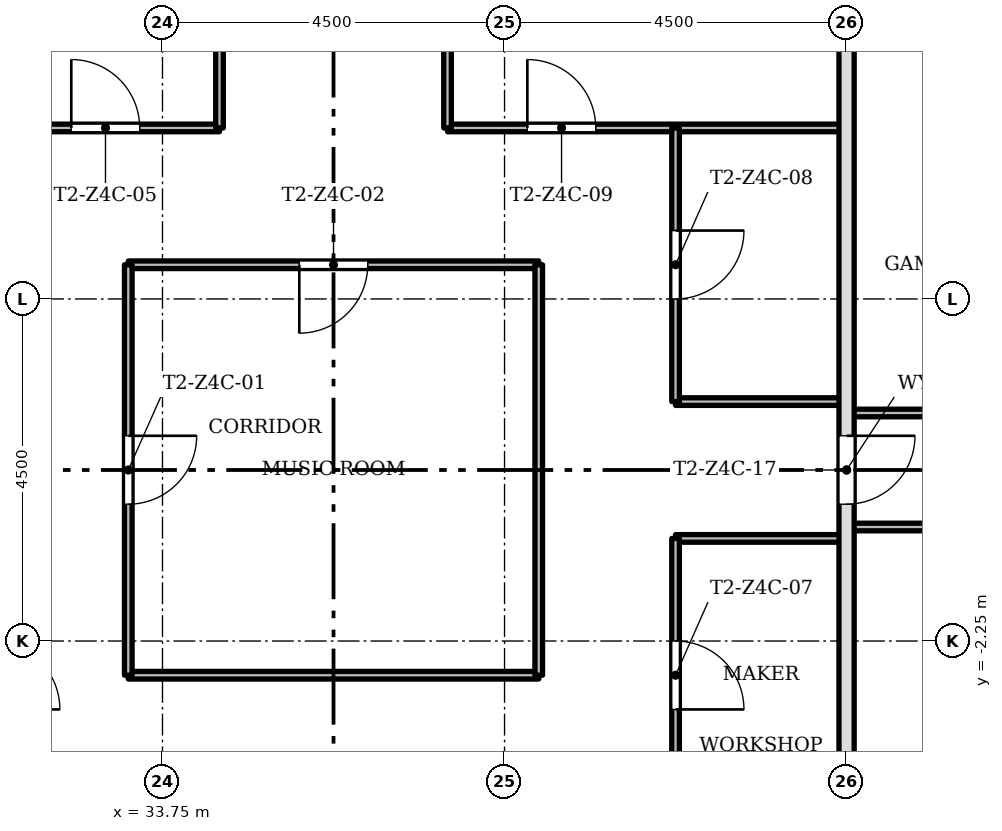
"""IFC4 building model, lengths in metres.
Left out: names, types, materials, properties, quantities, classifications, styles, units other than length and angle.
Written with IfcOpenShell. Run it as: python <this file> out.ifc"""

import sys

from ifc_helpers import new_model, si_unit, direction, frame, frame_2d, origin, place, context, subcontext, project, spatial, rectangle, extrude, element, fill, save


model = new_model("IFC4")
c1 = context("Model", 3, precision=1e-05, world=origin(), true_north=direction((0.0, 1.0)))
c2 = subcontext(c1, "Body", "Model", "MODEL_VIEW")
j1 = project(units=[si_unit("LENGTHUNIT", "METRE"), si_unit("PLANEANGLEUNIT", "RADIAN")], contexts=[c1])
p1 = place(None, origin())
s1 = spatial("IfcSite", under=j1, at=p1, CompositionType="ELEMENT")
p2 = place(p1, origin())
s2 = spatial("IfcBuilding", under=s1, at=p2, CompositionType="ELEMENT")
p3 = place(p2, frame((0.0, 0.0, 192.6)))
s3 = spatial("IfcBuildingStorey", under=s2, at=p3, CompositionType="ELEMENT", Elevation=192.6)
p4 = place(p3, frame((38.7, -2.7, 0.0), z_axis=(0.0, 0.0, 1.0), x_axis=(-1.0, 0.0, 0.0)))
e1 = element("IfcWall", 1, at=p4, inside=s3, PredefinedType="PARTITIONING", context=c2, shape_type="SweptSolid", body=[
    extrude(rectangle(XDim=5.4, YDim=0.1, at=frame_2d((2.7, 0.0))), origin(), (0.0, 0.0, 1.0), 3.0),
])
p5 = place(p3, frame((42.75, -0.9, 0.0), z_axis=(0.0, 0.0, 1.0), x_axis=(-1.0, 0.0, 0.0)))
e2 = element("IfcWall", 2, at=p5, inside=s3, PredefinedType="PARTITIONING", context=c2, shape_type="SweptSolid", body=[
    extrude(rectangle(XDim=2.25, YDim=0.1, at=frame_2d((1.125, 0.0))), origin(), (0.0, 0.0, 1.0), 3.0),
])
p6 = place(p3, frame((47.25, -0.75, 0.0), z_axis=(0.0, 0.0, 1.0), x_axis=(-1.0, 0.0, 0.0)))
e3 = element("IfcWall", 3, at=p6, inside=s3, PredefinedType="PARTITIONING", context=c2, shape_type="SweptSolid", body=[
    extrude(rectangle(XDim=4.5, YDim=0.1, at=frame_2d((2.25, 0.0))), origin(), (0.0, 0.0, 1.0), 3.0),
])
p7 = place(p6, frame((1.8, 0.0, 0.0)))
e4 = element("IfcOpeningElement", 4, at=p7, cuts=e3, PredefinedType="OPENING", context=c2, shape_type="SweptSolid", body=[
    extrude(rectangle(XDim=0.9, YDim=2.1, at=frame_2d((0.45, 1.05))), frame((0.0, 0.06, 0.0), z_axis=(0.0, -1.0, 0.0), x_axis=(1.0, 0.0, 0.0)), (0.0, 0.0, 1.0), 0.12),
])
p8 = place(p3, frame((47.25, 0.75, 0.0), z_axis=(0.0, 0.0, 1.0), x_axis=(-1.0, 0.0, 0.0)))
e5 = element("IfcWall", 5, at=p8, inside=s3, PredefinedType="PARTITIONING", context=c2, shape_type="SweptSolid", body=[
    extrude(rectangle(XDim=4.5, YDim=0.1, at=frame_2d((2.25, 0.0))), origin(), (0.0, 0.0, 1.0), 3.0),
])
p9 = place(p8, frame((1.8, 0.0, 0.0)))
e6 = element("IfcOpeningElement", 6, at=p9, cuts=e5, PredefinedType="OPENING", context=c2, shape_type="SweptSolid", body=[
    extrude(rectangle(XDim=0.9, YDim=2.1, at=frame_2d((0.45, 1.05))), frame((0.0, 0.06, 0.0), z_axis=(0.0, -1.0, 0.0), x_axis=(1.0, 0.0, 0.0)), (0.0, 0.0, 1.0), 0.12),
])
p10 = place(p3, frame((42.75, 0.9, 0.0), z_axis=(0.0, 0.0, 1.0), x_axis=(-1.0, 0.0, 0.0)))
e7 = element("IfcWall", 7, at=p10, inside=s3, PredefinedType="PARTITIONING", context=c2, shape_type="SweptSolid", body=[
    extrude(rectangle(XDim=2.25, YDim=0.1, at=frame_2d((1.125, 0.0))), origin(), (0.0, 0.0, 1.0), 3.0),
])
p11 = place(p3, frame((38.7, 2.7, 0.0), z_axis=(0.0, 0.0, 1.0), x_axis=(-1.0, 0.0, 0.0)))
e8 = element("IfcWall", 8, at=p11, inside=s3, PredefinedType="PARTITIONING", context=c2, shape_type="SweptSolid", body=[
    extrude(rectangle(XDim=5.4, YDim=0.1, at=frame_2d((2.7, 0.0))), origin(), (0.0, 0.0, 1.0), 3.0),
])
p12 = place(p11, frame((2.25, 0.0, 0.0)))
e9 = element("IfcOpeningElement", 9, at=p12, cuts=e8, PredefinedType="OPENING", context=c2, shape_type="SweptSolid", body=[
    extrude(rectangle(XDim=0.9, YDim=2.1, at=frame_2d((0.45, 1.05))), frame((0.0, 0.06, 0.0), z_axis=(0.0, -1.0, 0.0), x_axis=(1.0, 0.0, 0.0)), (0.0, 0.0, 1.0), 0.12),
])
p13 = place(p3, frame((42.75, 4.5, 0.0), z_axis=(0.0, 0.0, 1.0), x_axis=(-1.0, 0.0, 0.0)))
e10 = element("IfcWall", 10, at=p13, inside=s3, PredefinedType="PARTITIONING", context=c2, shape_type="SweptSolid", body=[
    extrude(rectangle(XDim=5.25, YDim=0.1, at=frame_2d((2.625, 0.0))), origin(), (0.0, 0.0, 1.0), 3.0),
])
p14 = place(p13, frame((3.3, 0.0, 0.0)))
e11 = element("IfcOpeningElement", 11, at=p14, cuts=e10, PredefinedType="OPENING", context=c2, shape_type="SweptSolid", body=[
    extrude(rectangle(XDim=0.9, YDim=2.1, at=frame_2d((0.45, 1.05))), frame((0.0, 0.06, 0.0), z_axis=(0.0, -1.0, 0.0), x_axis=(1.0, 0.0, 0.0)), (0.0, 0.0, 1.0), 0.12),
])
p15 = place(p3, frame((34.5, 4.5, 0.0), z_axis=(0.0, 0.0, 1.0), x_axis=(-1.0, 0.0, 0.0)))
e12 = element("IfcWall", 12, at=p15, inside=s3, PredefinedType="PARTITIONING", context=c2, shape_type="SweptSolid", body=[
    extrude(rectangle(XDim=3.0, YDim=0.1, at=frame_2d((1.5, 0.0))), origin(), (0.0, 0.0, 1.0), 3.0),
])
p16 = place(p15, frame((1.05, 0.0, 0.0)))
e13 = element("IfcOpeningElement", 13, at=p16, cuts=e12, PredefinedType="OPENING", context=c2, shape_type="SweptSolid", body=[
    extrude(rectangle(XDim=0.9, YDim=2.1, at=frame_2d((0.45, 1.05))), frame((0.0, 0.06, 0.0), z_axis=(0.0, -1.0, 0.0), x_axis=(1.0, 0.0, 0.0)), (0.0, 0.0, 1.0), 0.12),
])
p17 = place(p3, frame((42.75, -6.85, 0.0), z_axis=(0.0, 0.0, 1.0), x_axis=(0.0, 1.0, 0.0)))
e14 = element("IfcWall", 14, at=p17, inside=s3, PredefinedType="SOLIDWALL", context=c2, shape_type="SweptSolid", body=[
    extrude(rectangle(XDim=13.7, YDim=0.2, at=frame_2d((6.85, 0.0))), origin(), (0.0, 0.0, 1.0), 3.0),
])
p18 = place(p17, frame((6.4, 0.0, 0.0)))
e15 = element("IfcOpeningElement", 15, at=p18, cuts=e14, PredefinedType="OPENING", context=c2, shape_type="SweptSolid", body=[
    extrude(rectangle(XDim=0.9, YDim=2.1, at=frame_2d((0.45, 1.05))), frame((0.0, 0.11, 0.0), z_axis=(0.0, -1.0, 0.0), x_axis=(1.0, 0.0, 0.0)), (0.0, 0.0, 1.0), 0.22),
])
p19 = place(p3, frame((40.5, -4.5, 0.0), z_axis=(0.0, 0.0, 1.0), x_axis=(0.0, 1.0, 0.0)))
e16 = element("IfcWall", 16, at=p19, inside=s3, PredefinedType="PARTITIONING", context=c2, shape_type="SweptSolid", body=[
    extrude(rectangle(XDim=3.6, YDim=0.1, at=frame_2d((1.8, 0.0))), origin(), (0.0, 0.0, 1.0), 3.0),
])
p20 = place(p19, frame((1.35, 0.0, 0.0)))
e17 = element("IfcOpeningElement", 17, at=p20, cuts=e16, PredefinedType="OPENING", context=c2, shape_type="SweptSolid", body=[
    extrude(rectangle(XDim=0.9, YDim=2.1, at=frame_2d((0.45, 1.05))), frame((0.0, 0.06, 0.0), z_axis=(0.0, -1.0, 0.0), x_axis=(1.0, 0.0, 0.0)), (0.0, 0.0, 1.0), 0.12),
])
p21 = place(p3, frame((40.5, 0.9, 0.0), z_axis=(0.0, 0.0, 1.0), x_axis=(0.0, 1.0, 0.0)))
e18 = element("IfcWall", 18, at=p21, inside=s3, PredefinedType="PARTITIONING", context=c2, shape_type="SweptSolid", body=[
    extrude(rectangle(XDim=3.6, YDim=0.1, at=frame_2d((1.8, 0.0))), origin(), (0.0, 0.0, 1.0), 3.0),
])
p22 = place(p21, frame((1.35, 0.0, 0.0)))
e19 = element("IfcOpeningElement", 19, at=p22, cuts=e18, PredefinedType="OPENING", context=c2, shape_type="SweptSolid", body=[
    extrude(rectangle(XDim=0.9, YDim=2.1, at=frame_2d((0.45, 1.05))), frame((0.0, 0.06, 0.0), z_axis=(0.0, -1.0, 0.0), x_axis=(1.0, 0.0, 0.0)), (0.0, 0.0, 1.0), 0.12),
])
p23 = place(p3, frame((38.7, -2.7, 0.0), z_axis=(0.0, 0.0, 1.0), x_axis=(0.0, 1.0, 0.0)))
e20 = element("IfcWall", 20, at=p23, inside=s3, PredefinedType="PARTITIONING", context=c2, shape_type="SweptSolid", body=[
    extrude(rectangle(XDim=5.4, YDim=0.1, at=frame_2d((2.7, 0.0))), origin(), (0.0, 0.0, 1.0), 3.0),
])
for number, where, z_axis, x_axis in (
    (21, (37.5, 4.5, 0.0), (0.0, 0.0, 1.0), (0.0, 1.0, 0.0)),
    (22, (34.5, 4.5, 0.0), (0.0, 0.0, 1.0), (0.0, 1.0, 0.0)),
):
    element("IfcWall", number, at=place(p3, frame(where, z_axis=z_axis, x_axis=x_axis)), inside=s3, PredefinedType="PARTITIONING", context=c2, shape_type="SweptSolid", body=[
        extrude(rectangle(XDim=2.25, YDim=0.1, at=frame_2d((1.125, 0.0))), origin(), (0.0, 0.0, 1.0), 3.0),
    ])
p24 = place(p3, frame((33.3, -2.7, 0.0), z_axis=(0.0, 0.0, 1.0), x_axis=(0.0, 1.0, 0.0)))
e23 = element("IfcWall", 23, at=p24, inside=s3, PredefinedType="PARTITIONING", context=c2, shape_type="SweptSolid", body=[
    extrude(rectangle(XDim=5.4, YDim=0.1, at=frame_2d((2.7, 0.0))), origin(), (0.0, 0.0, 1.0), 3.0),
])
p25 = place(p24, frame((2.25, 0.0, 0.0)))
e24 = element("IfcOpeningElement", 24, at=p25, cuts=e23, PredefinedType="OPENING", context=c2, shape_type="SweptSolid", body=[
    extrude(rectangle(XDim=0.9, YDim=2.1, at=frame_2d((0.45, 1.05))), frame((0.0, 0.06, 0.0), z_axis=(0.0, -1.0, 0.0), x_axis=(1.0, 0.0, 0.0)), (0.0, 0.0, 1.0), 0.12),
])
p26 = place(p25, origin())
e25 = element("IfcDoor", 25, at=p26, inside=s3, OperationType="SINGLE_SWING_RIGHT", PredefinedType="DOOR", context=c2, shape_type="SweptSolid", body=[
    extrude(rectangle(XDim=0.9, YDim=2.1, at=frame_2d((0.45, 1.05))), frame((0.0, 0.025, 0.0), z_axis=(0.0, -1.0, 0.0), x_axis=(1.0, 0.0, 0.0)), (0.0, 0.0, 1.0), 0.05),
])
fill(e24, e25)
p27 = place(p12, origin())
e26 = element("IfcDoor", 26, at=p27, inside=s3, OperationType="SINGLE_SWING_LEFT", PredefinedType="DOOR", context=c2, shape_type="SweptSolid", body=[
    extrude(rectangle(XDim=0.9, YDim=2.1, at=frame_2d((0.45, 1.05))), frame((0.0, 0.025, 0.0), z_axis=(0.0, -1.0, 0.0), x_axis=(1.0, 0.0, 0.0)), (0.0, 0.0, 1.0), 0.05),
])
fill(e9, e26)
p28 = place(p16, origin())
e27 = element("IfcDoor", 27, at=p28, inside=s3, OperationType="SINGLE_SWING_RIGHT", PredefinedType="DOOR", context=c2, shape_type="SweptSolid", body=[
    extrude(rectangle(XDim=0.9, YDim=2.1, at=frame_2d((0.45, 1.05))), frame((0.0, 0.025, 0.0), z_axis=(0.0, -1.0, 0.0), x_axis=(1.0, 0.0, 0.0)), (0.0, 0.0, 1.0), 0.05),
])
fill(e13, e27)
p29 = place(p20, origin())
e28 = element("IfcDoor", 28, at=p29, inside=s3, OperationType="SINGLE_SWING_LEFT", PredefinedType="DOOR", context=c2, shape_type="SweptSolid", body=[
    extrude(rectangle(XDim=0.9, YDim=2.1, at=frame_2d((0.45, 1.05))), frame((0.0, 0.025, 0.0), z_axis=(0.0, -1.0, 0.0), x_axis=(1.0, 0.0, 0.0)), (0.0, 0.0, 1.0), 0.05),
])
fill(e17, e28)
p30 = place(p22, origin())
e29 = element("IfcDoor", 29, at=p30, inside=s3, OperationType="SINGLE_SWING_RIGHT", PredefinedType="DOOR", context=c2, shape_type="SweptSolid", body=[
    extrude(rectangle(XDim=0.9, YDim=2.1, at=frame_2d((0.45, 1.05))), frame((0.0, 0.025, 0.0), z_axis=(0.0, -1.0, 0.0), x_axis=(1.0, 0.0, 0.0)), (0.0, 0.0, 1.0), 0.05),
])
fill(e19, e29)
p31 = place(p14, origin())
e30 = element("IfcDoor", 30, at=p31, inside=s3, OperationType="SINGLE_SWING_RIGHT", PredefinedType="DOOR", context=c2, shape_type="SweptSolid", body=[
    extrude(rectangle(XDim=0.9, YDim=2.1, at=frame_2d((0.45, 1.05))), frame((0.0, 0.025, 0.0), z_axis=(0.0, -1.0, 0.0), x_axis=(1.0, 0.0, 0.0)), (0.0, 0.0, 1.0), 0.05),
])
fill(e11, e30)
p32 = place(p18, origin())
e31 = element("IfcDoor", 31, at=p32, inside=s3, OperationType="SINGLE_SWING_RIGHT", PredefinedType="DOOR", context=c2, shape_type="SweptSolid", body=[
    extrude(rectangle(XDim=0.9, YDim=2.1, at=frame_2d((0.45, 1.05))), frame((0.0, 0.025, 0.0), z_axis=(0.0, -1.0, 0.0), x_axis=(1.0, 0.0, 0.0)), (0.0, 0.0, 1.0), 0.05),
])
fill(e15, e31)
save(model, sys.argv[1])
